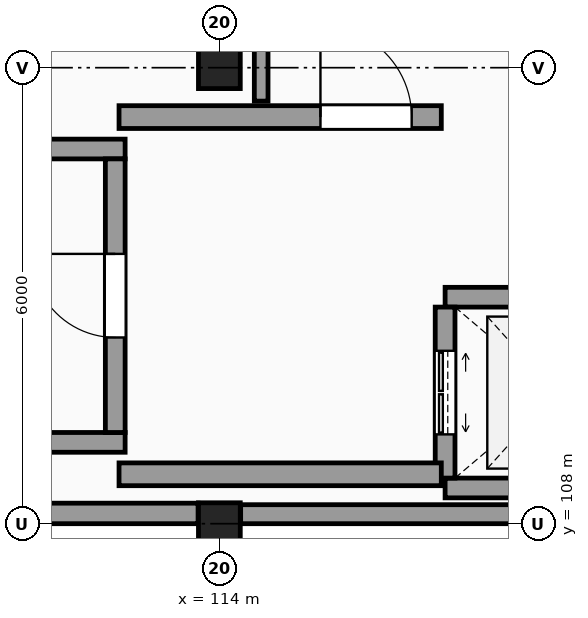
"""IFC4 building model, lengths in metres.
Left out: names, types, materials, properties, quantities, classifications, styles, units other than length and angle.
Written with IfcOpenShell. Run it as: python <this file> out.ifc"""

import sys

from ifc_helpers import new_model, si_unit, direction, frame, frame_2d, origin, origin_2d, place, context, subcontext, project, spatial, rectangle, extrude, element, fill, save


model = new_model("IFC4")
c1 = context("Model", 3, precision=1e-05, world=origin(), true_north=direction((0.0, 1.0)))
c2 = subcontext(c1, "Body", "Model", "MODEL_VIEW")
j1 = project(units=[si_unit("LENGTHUNIT", "METRE"), si_unit("PLANEANGLEUNIT", "RADIAN")], contexts=[c1])
p1 = place(None, origin())
s1 = spatial("IfcSite", under=j1, at=p1, CompositionType="ELEMENT")
p2 = place(p1, origin())
s2 = spatial("IfcBuilding", under=s1, at=p2, CompositionType="ELEMENT")
p3 = place(p2, frame((0.0, 0.0, 31.5)))
s3 = spatial("IfcBuildingStorey", under=s2, at=p3, CompositionType="ELEMENT", Elevation=31.5)
for number, where, z_axis, x_axis in (
    (1, (114.0, 108.0, 0.0), (0.0, 0.0, 1.0), (1.0, 0.0, 0.0)),
    (2, (114.0, 114.0, 0.0), (0.0, 0.0, 1.0), (1.0, 0.0, 0.0)),
):
    element("IfcColumn", number, at=place(p3, frame(where, z_axis=z_axis, x_axis=x_axis)), inside=s3, PredefinedType="COLUMN", context=c2, shape_type="SweptSolid", body=[
        extrude(rectangle(XDim=0.55, YDim=0.55, at=origin_2d()), origin(), (0.0, 0.0, 1.0), 3.3),
    ])
p4 = place(p3, frame((108.305, 108.135, 0.0), z_axis=(0.0, 0.0, 1.0), x_axis=(1.0, 0.0, 0.0)))
e3 = element("IfcWall", 3, at=p4, inside=s3, PredefinedType="SOLIDWALL", context=c2, shape_type="SweptSolid", body=[
    extrude(rectangle(XDim=5.415, YDim=0.27, at=frame_2d((2.708, 0.0))), origin(), (0.0, 0.0, 1.0), 2.42),
])
p5 = place(p3, frame((114.28, 108.125, 0.0), z_axis=(0.0, 0.0, 1.0), x_axis=(1.0, 0.0, 0.0)))
e4 = element("IfcWall", 4, at=p5, inside=s3, PredefinedType="SOLIDWALL", context=c2, shape_type="SweptSolid", body=[
    extrude(rectangle(XDim=5.415, YDim=0.25, at=frame_2d((2.708, 0.0))), origin(), (0.0, 0.0, 1.0), 2.42),
])
for number, where, z_axis, x_axis in (
    (5, (102.04, 109.07, 0.0), (0.0, 0.0, 1.0), (1.0, 0.0, 0.0)),
    (6, (102.04, 112.93, 0.0), (0.0, 0.0, 1.0), (1.0, 0.0, 0.0)),
):
    element("IfcWall", number, at=place(p3, frame(where, z_axis=z_axis, x_axis=x_axis)), inside=s3, PredefinedType="SHEAR", context=c2, shape_type="SweptSolid", body=[
        extrude(rectangle(XDim=10.72, YDim=0.26, at=frame_2d((5.36, 0.0))), origin(), (0.0, 0.0, 1.0), 3.3),
    ])
p6 = place(p3, frame((112.63, 109.2, 0.0), z_axis=(0.0, 0.0, 1.0), x_axis=(0.0, 1.0, 0.0)))
e7 = element("IfcWall", 7, at=p6, inside=s3, PredefinedType="SHEAR", context=c2, shape_type="SweptSolid", body=[
    extrude(rectangle(XDim=3.6, YDim=0.26, at=frame_2d((1.8, 0.0))), origin(), (0.0, 0.0, 1.0), 3.3),
])
p7 = place(p6, frame((1.25, 0.0, 0.0)))
e8 = element("IfcOpeningElement", 8, at=p7, cuts=e7, PredefinedType="OPENING", context=c2, shape_type="SweptSolid", body=[
    extrude(rectangle(XDim=1.1, YDim=2.15, at=frame_2d((0.55, 1.075))), frame((0.0, 0.14, 0.0), z_axis=(0.0, -1.0, 0.0), x_axis=(1.0, 0.0, 0.0)), (0.0, 0.0, 1.0), 0.28),
])
for number, where, z_axis, x_axis in (
    (9, (116.97, 108.47, 0.0), (0.0, 0.0, 1.0), (1.0, 0.0, 0.0)),
    (10, (116.97, 110.98, 0.0), (0.0, 0.0, 1.0), (1.0, 0.0, 0.0)),
):
    element("IfcWall", number, at=place(p3, frame(where, z_axis=z_axis, x_axis=x_axis)), inside=s3, PredefinedType="SHEAR", context=c2, shape_type="SweptSolid", body=[
        extrude(rectangle(XDim=2.91, YDim=0.26, at=frame_2d((1.455, 0.0))), origin(), (0.0, 0.0, 1.0), 3.3),
    ])
p8 = place(p3, frame((116.97, 108.6, 0.0), z_axis=(0.0, 0.0, 1.0), x_axis=(0.0, 1.0, 0.0)))
e11 = element("IfcWall", 11, at=p8, inside=s3, PredefinedType="SHEAR", context=c2, shape_type="SweptSolid", body=[
    extrude(rectangle(XDim=2.25, YDim=0.26, at=frame_2d((1.125, 0.0))), origin(), (0.0, 0.0, 1.0), 3.3),
])
p9 = place(p8, frame((0.575, 0.0, 0.0)))
e12 = element("IfcOpeningElement", 12, at=p9, cuts=e11, PredefinedType="OPENING", context=c2, shape_type="SweptSolid", body=[
    extrude(rectangle(XDim=1.1, YDim=2.2, at=frame_2d((0.55, 1.1))), frame((0.0, 0.14, 0.0), z_axis=(0.0, -1.0, 0.0), x_axis=(1.0, 0.0, 0.0)), (0.0, 0.0, 1.0), 0.28),
])
p10 = place(p3, frame((112.68, 113.35, 0.0), z_axis=(0.0, 0.0, 1.0), x_axis=(1.0, 0.0, 0.0)))
e13 = element("IfcWall", 13, at=p10, inside=s3, PredefinedType="SHEAR", context=c2, shape_type="SweptSolid", body=[
    extrude(rectangle(XDim=4.24, YDim=0.3, at=frame_2d((2.12, 0.0))), origin(), (0.0, 0.0, 1.0), 3.3),
])
p11 = place(p10, frame((2.65, 0.0, 0.0)))
e14 = element("IfcOpeningElement", 14, at=p11, cuts=e13, PredefinedType="OPENING", context=c2, shape_type="SweptSolid", body=[
    extrude(rectangle(XDim=1.2, YDim=2.2, at=frame_2d((0.6, 1.1))), frame((0.0, 0.16, 0.0), z_axis=(0.0, -1.0, 0.0), x_axis=(1.0, 0.0, 0.0)), (0.0, 0.0, 1.0), 0.32),
])
p12 = place(p3, frame((112.68, 108.65, 0.0), z_axis=(0.0, 0.0, 1.0), x_axis=(1.0, 0.0, 0.0)))
e15 = element("IfcWall", 15, at=p12, inside=s3, PredefinedType="SHEAR", context=c2, shape_type="SweptSolid", body=[
    extrude(rectangle(XDim=4.24, YDim=0.3, at=frame_2d((2.12, 0.0))), origin(), (0.0, 0.0, 1.0), 3.3),
])
p13 = place(p3, frame((114.55, 113.56, 0.0), z_axis=(0.0, 0.0, 1.0), x_axis=(0.0, 1.0, 0.0)))
e16 = element("IfcWall", 16, at=p13, inside=s3, PredefinedType="PARTITIONING", context=c2, shape_type="SweptSolid", body=[
    extrude(rectangle(XDim=2.24, YDim=0.18, at=frame_2d((1.12, 0.0))), origin(), (0.0, 0.0, 1.0), 3.07),
])
p14 = place(p7, origin())
e17 = element("IfcDoor", 17, at=p14, inside=s3, OperationType="SINGLE_SWING_RIGHT", PredefinedType="DOOR", context=c2, shape_type="SweptSolid", body=[
    extrude(rectangle(XDim=1.1, YDim=2.15, at=frame_2d((0.55, 1.075))), frame((0.0, 0.025, 0.0), z_axis=(0.0, -1.0, 0.0), x_axis=(1.0, 0.0, 0.0)), (0.0, 0.0, 1.0), 0.05),
])
fill(e8, e17)
p15 = place(p9, origin())
e18 = element("IfcDoor", 18, at=p15, inside=s3, OperationType="DOUBLE_DOOR_SLIDING", PredefinedType="DOOR", context=c2, shape_type="SweptSolid", body=[
    extrude(rectangle(XDim=1.1, YDim=2.2, at=frame_2d((0.55, 1.1))), frame((0.0, 0.025, 0.0), z_axis=(0.0, -1.0, 0.0), x_axis=(1.0, 0.0, 0.0)), (0.0, 0.0, 1.0), 0.05),
])
fill(e12, e18)
p16 = place(p11, origin())
e19 = element("IfcDoor", 19, at=p16, inside=s3, OperationType="SINGLE_SWING_LEFT", PredefinedType="DOOR", context=c2, shape_type="SweptSolid", body=[
    extrude(rectangle(XDim=1.2, YDim=2.2, at=frame_2d((0.6, 1.1))), frame((0.0, 0.025, 0.0), z_axis=(0.0, -1.0, 0.0), x_axis=(1.0, 0.0, 0.0)), (0.0, 0.0, 1.0), 0.05),
])
fill(e14, e19)
save(model, sys.argv[1])
